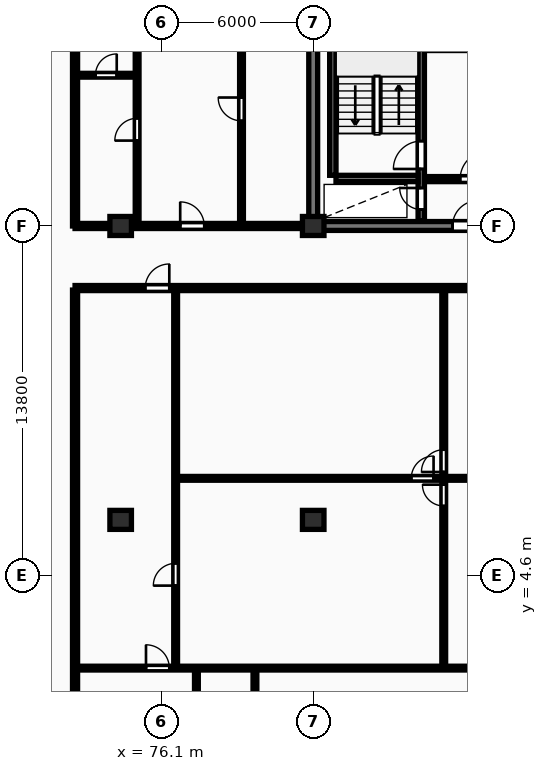
"""IFC4 building model, lengths in metres.
Left out: names, types, materials, properties, quantities, classifications, styles, units other than length and angle.
Written with IfcOpenShell. Run it as: python <this file> out.ifc"""

import sys

from ifc_helpers import new_model, si_unit, direction, frame, frame_2d, origin, origin_2d, place, context, subcontext, project, spatial, rectangle, extrude, element, fill, save


model = new_model("IFC4")
c1 = context("Model", 3, precision=1e-05, world=origin(), true_north=direction((0.0, 1.0)))
c2 = subcontext(c1, "Body", "Model", "MODEL_VIEW")
j1 = project(units=[si_unit("LENGTHUNIT", "METRE"), si_unit("PLANEANGLEUNIT", "RADIAN")], contexts=[c1])
p1 = place(None, origin())
s1 = spatial("IfcSite", under=j1, at=p1, CompositionType="ELEMENT")
p2 = place(p1, origin())
s2 = spatial("IfcBuilding", under=s1, at=p2, CompositionType="ELEMENT")
p3 = place(p2, frame((0.0, 0.0, 132.8)))
s3 = spatial("IfcBuildingStorey", under=s2, at=p3, CompositionType="ELEMENT", Elevation=132.8)
for number, where, z_axis, x_axis in (
    (1, (74.5, 6.8, 0.0), (0.0, 0.0, 1.0), (1.0, 0.0, 0.0)),
    (2, (74.5, 18.4, 0.0), (0.0, 0.0, 1.0), (1.0, 0.0, 0.0)),
    (3, (82.1, 6.8, 0.0), (0.0, 0.0, 1.0), (1.0, 0.0, 0.0)),
    (4, (82.1, 18.4, 0.0), (0.0, 0.0, 1.0), (1.0, 0.0, 0.0)),
):
    element("IfcColumn", number, at=place(p3, frame(where, z_axis=z_axis, x_axis=x_axis)), inside=s3, PredefinedType="COLUMN", context=c2, shape_type="SweptSolid", body=[
        extrude(rectangle(XDim=0.85, YDim=0.75, at=origin_2d()), origin(), (0.0, 0.0, 1.0), 3.25),
    ])
p4 = place(p3, frame((82.1, 18.575, 0.0), z_axis=(0.0, 0.0, 1.0), x_axis=(0.0, 1.0, 0.0)))
e5 = element("IfcWall", 5, at=p4, inside=s3, PredefinedType="SHEAR", context=c2, shape_type="SweptSolid", body=[
    extrude(rectangle(XDim=11.65, YDim=0.35, at=frame_2d((5.825, 0.0))), origin(), (0.0, 0.0, 1.0), 3.25),
])
p5 = place(p3, frame((81.925, 18.4, 0.0), z_axis=(0.0, 0.0, 1.0), x_axis=(1.0, 0.0, 0.0)))
e6 = element("IfcWall", 6, at=p5, inside=s3, PredefinedType="SHEAR", context=c2, shape_type="SweptSolid", body=[
    extrude(rectangle(XDim=36.265, YDim=0.35, at=frame_2d((18.132, 0.0))), origin(), (0.0, 0.0, 1.0), 3.25),
])
p6 = place(p5, frame((5.675, 0.0, 0.0)))
e7 = element("IfcOpeningElement", 7, at=p6, cuts=e6, PredefinedType="OPENING", context=c2, shape_type="SweptSolid", body=[
    extrude(rectangle(XDim=1.0, YDim=2.15, at=frame_2d((0.5, 1.075))), frame((0.0, 0.185, 0.0), z_axis=(0.0, -1.0, 0.0), x_axis=(1.0, 0.0, 0.0)), (0.0, 0.0, 1.0), 0.37),
])
p7 = place(p5, frame((21.925, 0.0, 0.0)))
e8 = element("IfcOpeningElement", 8, at=p7, cuts=e6, PredefinedType="OPENING", context=c2, shape_type="SweptSolid", body=[
    extrude(rectangle(XDim=1.5, YDim=2.2, at=frame_2d((0.75, 1.1))), frame((0.0, 0.185, 0.0), z_axis=(0.0, -1.0, 0.0), x_axis=(1.0, 0.0, 0.0)), (0.0, 0.0, 1.0), 0.37),
])
p8 = place(p5, frame((29.875, 0.0, 0.0)))
e9 = element("IfcOpeningElement", 9, at=p8, cuts=e6, PredefinedType="OPENING", context=c2, shape_type="SweptSolid", body=[
    extrude(rectangle(XDim=1.0, YDim=2.15, at=frame_2d((0.5, 1.075))), frame((0.0, 0.185, 0.0), z_axis=(0.0, -1.0, 0.0), x_axis=(1.0, 0.0, 0.0)), (0.0, 0.0, 1.0), 0.37),
])
p9 = place(p3, frame((82.875, 20.4, 0.0), z_axis=(0.0, 0.0, 1.0), x_axis=(0.0, 1.0, 0.0)))
e10 = element("IfcWall", 10, at=p9, inside=s3, PredefinedType="SHEAR", context=c2, shape_type="SweptSolid", body=[
    extrude(rectangle(XDim=7.6, YDim=0.25, at=frame_2d((3.8, 0.0))), origin(), (0.0, 0.0, 1.0), 3.25),
])
p10 = place(p3, frame((86.365, 18.6, 0.0), z_axis=(0.0, 0.0, 1.0), x_axis=(0.0, 1.0, 0.0)))
e11 = element("IfcWall", 11, at=p10, inside=s3, PredefinedType="SHEAR", context=c2, shape_type="SweptSolid", body=[
    extrude(rectangle(XDim=11.6, YDim=0.25, at=frame_2d((5.8, 0.0))), origin(), (0.0, 0.0, 1.0), 3.25),
])
p11 = place(p10, frame((0.45, 0.0, 0.0)))
e12 = element("IfcOpeningElement", 12, at=p11, cuts=e11, PredefinedType="OPENING", context=c2, shape_type="SweptSolid", body=[
    extrude(rectangle(XDim=0.85, YDim=2.05, at=frame_2d((0.425, 1.025))), frame((0.0, 0.135, 0.0), z_axis=(0.0, -1.0, 0.0), x_axis=(1.0, 0.0, 0.0)), (0.0, 0.0, 1.0), 0.27),
])
p12 = place(p10, frame((2.05, 0.0, 0.0)))
e13 = element("IfcOpeningElement", 13, at=p12, cuts=e11, PredefinedType="OPENING", context=c2, shape_type="SweptSolid", body=[
    extrude(rectangle(XDim=1.1, YDim=2.1, at=frame_2d((0.55, 1.05))), frame((0.0, 0.135, 0.0), z_axis=(0.0, -1.0, 0.0), x_axis=(1.0, 0.0, 0.0)), (0.0, 0.0, 1.0), 0.27),
])
p13 = place(p10, frame((9.95, 0.0, 0.0)))
e14 = element("IfcOpeningElement", 14, at=p13, cuts=e11, PredefinedType="OPENING", context=c2, shape_type="SweptSolid", body=[
    extrude(rectangle(XDim=0.85, YDim=2.05, at=frame_2d((0.425, 1.025))), frame((0.0, 0.135, 0.0), z_axis=(0.0, -1.0, 0.0), x_axis=(1.0, 0.0, 0.0)), (0.0, 0.0, 1.0), 0.27),
])
p14 = place(p3, frame((83.0, 20.275, 0.0), z_axis=(0.0, 0.0, 1.0), x_axis=(1.0, 0.0, 0.0)))
e15 = element("IfcWall", 15, at=p14, inside=s3, PredefinedType="SHEAR", context=c2, shape_type="SweptSolid", body=[
    extrude(rectangle(XDim=3.24, YDim=0.25, at=frame_2d((1.62, 0.0))), origin(), (0.0, 0.0, 1.0), 3.25),
])
p15 = place(p3, frame((86.5, 20.25, 0.0), z_axis=(0.0, 0.0, 1.0), x_axis=(1.0, 0.0, 0.0)))
e16 = element("IfcWall", 16, at=p15, inside=s3, PredefinedType="PARTITIONING", context=c2, shape_type="SweptSolid", body=[
    extrude(rectangle(XDim=4.32, YDim=0.2, at=frame_2d((2.16, 0.0))), origin(), (0.0, 0.0, 1.0), 2.97),
])
p16 = place(p15, frame((1.4, 0.0, 0.0)))
e17 = element("IfcOpeningElement", 17, at=p16, cuts=e16, PredefinedType="OPENING", context=c2, shape_type="SweptSolid", body=[
    extrude(rectangle(XDim=1.1, YDim=2.1, at=frame_2d((0.55, 1.05))), frame((0.0, 0.11, 0.0), z_axis=(0.0, -1.0, 0.0), x_axis=(1.0, 0.0, 0.0)), (0.0, 0.0, 1.0), 0.22),
])
p17 = place(p3, frame((72.7, 18.4, 0.0), z_axis=(0.0, 0.0, 1.0), x_axis=(0.0, 1.0, 0.0)))
e18 = element("IfcWall", 18, at=p17, inside=s3, PredefinedType="PARTITIONING", context=c2, shape_type="SweptSolid", body=[
    extrude(rectangle(XDim=14.1, YDim=0.2, at=frame_2d((7.05, 0.0))), origin(), (0.0, 0.0, 1.0), 2.97),
])
p18 = place(p3, frame((72.7, 24.35, 0.0), z_axis=(0.0, 0.0, 1.0), x_axis=(1.0, 0.0, 0.0)))
e19 = element("IfcWall", 19, at=p18, inside=s3, PredefinedType="PARTITIONING", context=c2, shape_type="SweptSolid", body=[
    extrude(rectangle(XDim=2.45, YDim=0.15, at=frame_2d((1.225, 0.0))), origin(), (0.0, 0.0, 1.0), 2.97),
])
p19 = place(p18, frame((0.805, 0.0, 0.0)))
e20 = element("IfcOpeningElement", 20, at=p19, cuts=e19, PredefinedType="OPENING", context=c2, shape_type="SweptSolid", body=[
    extrude(rectangle(XDim=0.84, YDim=2.04, at=frame_2d((0.42, 1.02))), frame((0.0, 0.085, 0.0), z_axis=(0.0, -1.0, 0.0), x_axis=(1.0, 0.0, 0.0)), (0.0, 0.0, 1.0), 0.17),
])
p20 = place(p3, frame((75.15, 18.45, 0.0), z_axis=(0.0, 0.0, 1.0), x_axis=(0.0, 1.0, 0.0)))
e21 = element("IfcWall", 21, at=p20, inside=s3, PredefinedType="PARTITIONING", context=c2, shape_type="SweptSolid", body=[
    extrude(rectangle(XDim=14.05, YDim=0.15, at=frame_2d((7.025, 0.0))), origin(), (0.0, 0.0, 1.0), 2.97),
])
p21 = place(p20, frame((3.32, 0.0, 0.0)))
e22 = element("IfcOpeningElement", 22, at=p21, cuts=e21, PredefinedType="OPENING", context=c2, shape_type="SweptSolid", body=[
    extrude(rectangle(XDim=0.88, YDim=2.06, at=frame_2d((0.44, 1.03))), frame((0.0, 0.085, 0.0), z_axis=(0.0, -1.0, 0.0), x_axis=(1.0, 0.0, 0.0)), (0.0, 0.0, 1.0), 0.17),
])
p22 = place(p3, frame((79.27, 18.45, 0.0), z_axis=(0.0, 0.0, 1.0), x_axis=(0.0, 1.0, 0.0)))
e23 = element("IfcWall", 23, at=p22, inside=s3, PredefinedType="PARTITIONING", context=c2, shape_type="SweptSolid", body=[
    extrude(rectangle(XDim=9.12, YDim=0.15, at=frame_2d((4.56, 0.0))), origin(), (0.0, 0.0, 1.0), 2.97),
])
p23 = place(p22, frame((4.1, 0.0, 0.0)))
e24 = element("IfcOpeningElement", 24, at=p23, cuts=e23, PredefinedType="OPENING", context=c2, shape_type="SweptSolid", body=[
    extrude(rectangle(XDim=0.92, YDim=2.08, at=frame_2d((0.46, 1.04))), frame((0.0, 0.085, 0.0), z_axis=(0.0, -1.0, 0.0), x_axis=(1.0, 0.0, 0.0)), (0.0, 0.0, 1.0), 0.17),
])
p24 = place(p3, frame((72.7, 18.4, 0.0), z_axis=(0.0, 0.0, 1.0), x_axis=(1.0, 0.0, 0.0)))
e25 = element("IfcWall", 25, at=p24, inside=s3, PredefinedType="PARTITIONING", context=c2, shape_type="SweptSolid", body=[
    extrude(rectangle(XDim=9.25, YDim=0.2, at=frame_2d((4.625, 0.0))), origin(), (0.0, 0.0, 1.0), 2.358),
])
p25 = place(p24, frame((4.15, 0.0, 0.0)))
e26 = element("IfcOpeningElement", 26, at=p25, cuts=e25, PredefinedType="OPENING", context=c2, shape_type="SweptSolid", body=[
    extrude(rectangle(XDim=0.95, YDim=2.15, at=frame_2d((0.475, 1.075))), frame((0.0, 0.11, 0.0), z_axis=(0.0, -1.0, 0.0), x_axis=(1.0, 0.0, 0.0)), (0.0, 0.0, 1.0), 0.22),
])
p26 = place(p3, frame((72.7, -8.7, 0.0), z_axis=(0.0, 0.0, 1.0), x_axis=(0.0, 1.0, 0.0)))
e27 = element("IfcWall", 27, at=p26, inside=s3, PredefinedType="PARTITIONING", context=c2, shape_type="SweptSolid", body=[
    extrude(rectangle(XDim=24.57, YDim=0.2, at=frame_2d((12.285, 0.0))), origin(), (0.0, 0.0, 1.0), 2.97),
])
p27 = place(p3, frame((87.252, 0.99, 0.0), z_axis=(0.0, 0.0, 1.0), x_axis=(0.0, 1.0, 0.0)))
e28 = element("IfcWall", 28, at=p27, inside=s3, PredefinedType="PARTITIONING", context=c2, shape_type="SweptSolid", body=[
    extrude(rectangle(XDim=14.9, YDim=0.15, at=frame_2d((7.45, 0.0))), origin(), (0.0, 0.0, 1.0), 2.97),
])
p28 = place(p27, frame((6.36, 0.0, 0.0)))
e29 = element("IfcOpeningElement", 29, at=p28, cuts=e28, PredefinedType="OPENING", context=c2, shape_type="SweptSolid", body=[
    extrude(rectangle(XDim=0.84, YDim=2.04, at=frame_2d((0.42, 1.02))), frame((0.0, 0.085, 0.0), z_axis=(0.0, -1.0, 0.0), x_axis=(1.0, 0.0, 0.0)), (0.0, 0.0, 1.0), 0.17),
])
p29 = place(p27, frame((7.7, 0.0, 0.0)))
e30 = element("IfcOpeningElement", 30, at=p29, cuts=e28, PredefinedType="OPENING", context=c2, shape_type="SweptSolid", body=[
    extrude(rectangle(XDim=0.88, YDim=2.06, at=frame_2d((0.44, 1.03))), frame((0.0, 0.085, 0.0), z_axis=(0.0, -1.0, 0.0), x_axis=(1.0, 0.0, 0.0)), (0.0, 0.0, 1.0), 0.17),
])
p30 = place(p3, frame((76.73, 8.44, 0.0), z_axis=(0.0, 0.0, 1.0), x_axis=(1.0, 0.0, 0.0)))
e31 = element("IfcWall", 31, at=p30, inside=s3, PredefinedType="PARTITIONING", context=c2, shape_type="SweptSolid", body=[
    extrude(rectangle(XDim=20.844, YDim=0.15, at=frame_2d((10.422, 0.0))), origin(), (0.0, 0.0, 1.0), 2.97),
])
p31 = place(p30, frame((9.241, 0.0, 0.0)))
e32 = element("IfcOpeningElement", 32, at=p31, cuts=e31, PredefinedType="OPENING", context=c2, shape_type="SweptSolid", body=[
    extrude(rectangle(XDim=0.88, YDim=2.06, at=frame_2d((0.44, 1.03))), frame((0.0, 0.085, 0.0), z_axis=(0.0, -1.0, 0.0), x_axis=(1.0, 0.0, 0.0)), (0.0, 0.0, 1.0), 0.17),
])
p32 = place(p3, frame((76.67, 0.99, 0.0), z_axis=(0.0, 0.0, 1.0), x_axis=(0.0, 1.0, 0.0)))
e33 = element("IfcWall", 33, at=p32, inside=s3, PredefinedType="PARTITIONING", context=c2, shape_type="SweptSolid", body=[
    extrude(rectangle(XDim=14.9, YDim=0.15, at=frame_2d((7.45, 0.0))), origin(), (0.0, 0.0, 1.0), 2.97),
])
p33 = place(p32, frame((3.216, 0.0, 0.0)))
e34 = element("IfcOpeningElement", 34, at=p33, cuts=e33, PredefinedType="OPENING", context=c2, shape_type="SweptSolid", body=[
    extrude(rectangle(XDim=0.88, YDim=2.06, at=frame_2d((0.44, 1.03))), frame((0.0, 0.085, 0.0), z_axis=(0.0, -1.0, 0.0), x_axis=(1.0, 0.0, 0.0)), (0.0, 0.0, 1.0), 0.17),
])
p34 = place(p3, frame((79.8, -1.67, 0.0), z_axis=(0.0, 0.0, 1.0), x_axis=(0.0, 1.0, 0.0)))
e35 = element("IfcWall", 35, at=p34, inside=s3, PredefinedType="PARTITIONING", context=c2, shape_type="SweptSolid", body=[
    extrude(rectangle(XDim=2.58, YDim=0.15, at=frame_2d((1.29, 0.0))), origin(), (0.0, 0.0, 1.0), 2.97),
])
p35 = place(p3, frame((77.49, -8.7, 0.0), z_axis=(0.0, 0.0, 1.0), x_axis=(0.0, 1.0, 0.0)))
e36 = element("IfcWall", 36, at=p35, inside=s3, PredefinedType="PARTITIONING", context=c2, shape_type="SweptSolid", body=[
    extrude(rectangle(XDim=9.61, YDim=0.15, at=frame_2d((4.805, 0.0))), origin(), (0.0, 0.0, 1.0), 2.97),
])
p36 = place(p35, frame((4.87, 0.0, 0.0)))
e37 = element("IfcOpeningElement", 37, at=p36, cuts=e36, PredefinedType="OPENING", context=c2, shape_type="SweptSolid", body=[
    extrude(rectangle(XDim=0.92, YDim=2.08, at=frame_2d((0.46, 1.04))), frame((0.0, 0.085, 0.0), z_axis=(0.0, -1.0, 0.0), x_axis=(1.0, 0.0, 0.0)), (0.0, 0.0, 1.0), 0.17),
])
p37 = place(p3, frame((72.78, 0.95, 0.0), z_axis=(0.0, 0.0, 1.0), x_axis=(1.0, 0.0, 0.0)))
e38 = element("IfcWall", 38, at=p37, inside=s3, PredefinedType="PARTITIONING", context=c2, shape_type="SweptSolid", body=[
    extrude(rectangle(XDim=24.794, YDim=0.15, at=frame_2d((12.397, 0.0))), origin(), (0.0, 0.0, 1.0), 2.97),
])
p38 = place(p37, frame((2.72, 0.0, 0.0)))
e39 = element("IfcOpeningElement", 39, at=p38, cuts=e38, PredefinedType="OPENING", context=c2, shape_type="SweptSolid", body=[
    extrude(rectangle(XDim=0.92, YDim=2.08, at=frame_2d((0.46, 1.04))), frame((0.0, 0.085, 0.0), z_axis=(0.0, -1.0, 0.0), x_axis=(1.0, 0.0, 0.0)), (0.0, 0.0, 1.0), 0.17),
])
p39 = place(p3, frame((72.7, 15.95, 0.0), z_axis=(0.0, 0.0, 1.0), x_axis=(1.0, 0.0, 0.0)))
e40 = element("IfcWall", 40, at=p39, inside=s3, PredefinedType="PARTITIONING", context=c2, shape_type="SweptSolid", body=[
    extrude(rectangle(XDim=58.0, YDim=0.2, at=frame_2d((29.0, 0.0))), origin(), (0.0, 0.0, 1.0), 2.97),
])
p40 = place(p39, frame((2.77, 0.0, 0.0)))
e41 = element("IfcOpeningElement", 41, at=p40, cuts=e40, PredefinedType="OPENING", context=c2, shape_type="SweptSolid", body=[
    extrude(rectangle(XDim=0.95, YDim=2.15, at=frame_2d((0.475, 1.075))), frame((0.0, 0.11, 0.0), z_axis=(0.0, -1.0, 0.0), x_axis=(1.0, 0.0, 0.0)), (0.0, 0.0, 1.0), 0.22),
])
p41 = place(p39, frame((25.324, 0.0, 0.0)))
e42 = element("IfcOpeningElement", 42, at=p41, cuts=e40, PredefinedType="OPENING", context=c2, shape_type="SweptSolid", body=[
    extrude(rectangle(XDim=0.95, YDim=2.15, at=frame_2d((0.475, 1.075))), frame((0.0, 0.11, 0.0), z_axis=(0.0, -1.0, 0.0), x_axis=(1.0, 0.0, 0.0)), (0.0, 0.0, 1.0), 0.22),
])
p42 = place(p39, frame((46.356, 0.0, 0.0)))
e43 = element("IfcOpeningElement", 43, at=p42, cuts=e40, PredefinedType="OPENING", context=c2, shape_type="SweptSolid", body=[
    extrude(rectangle(XDim=0.95, YDim=2.15, at=frame_2d((0.475, 1.075))), frame((0.0, 0.11, 0.0), z_axis=(0.0, -1.0, 0.0), x_axis=(1.0, 0.0, 0.0)), (0.0, 0.0, 1.0), 0.22),
])
p43 = place(p6, origin())
e44 = element("IfcDoor", 44, at=p43, inside=s3, OperationType="SINGLE_SWING_RIGHT", PredefinedType="DOOR", context=c2, shape_type="SweptSolid", body=[
    extrude(rectangle(XDim=1.0, YDim=2.15, at=frame_2d((0.5, 1.075))), frame((0.0, 0.025, 0.0), z_axis=(0.0, -1.0, 0.0), x_axis=(1.0, 0.0, 0.0)), (0.0, 0.0, 1.0), 0.05),
])
fill(e7, e44)
p44 = place(p11, origin())
e45 = element("IfcDoor", 45, at=p44, inside=s3, OperationType="SINGLE_SWING_RIGHT", PredefinedType="DOOR", context=c2, shape_type="SweptSolid", body=[
    extrude(rectangle(XDim=0.85, YDim=2.05, at=frame_2d((0.425, 1.025))), frame((0.0, 0.025, 0.0), z_axis=(0.0, -1.0, 0.0), x_axis=(1.0, 0.0, 0.0)), (0.0, 0.0, 1.0), 0.05),
])
fill(e12, e45)
p45 = place(p12, origin())
e46 = element("IfcDoor", 46, at=p45, inside=s3, OperationType="SINGLE_SWING_LEFT", PredefinedType="DOOR", context=c2, shape_type="SweptSolid", body=[
    extrude(rectangle(XDim=1.1, YDim=2.1, at=frame_2d((0.55, 1.05))), frame((0.0, 0.025, 0.0), z_axis=(0.0, -1.0, 0.0), x_axis=(1.0, 0.0, 0.0)), (0.0, 0.0, 1.0), 0.05),
])
fill(e13, e46)
p46 = place(p16, origin())
e47 = element("IfcDoor", 47, at=p46, inside=s3, OperationType="SINGLE_SWING_RIGHT", PredefinedType="DOOR", context=c2, shape_type="SweptSolid", body=[
    extrude(rectangle(XDim=1.1, YDim=2.1, at=frame_2d((0.55, 1.05))), frame((0.0, 0.025, 0.0), z_axis=(0.0, -1.0, 0.0), x_axis=(1.0, 0.0, 0.0)), (0.0, 0.0, 1.0), 0.05),
])
fill(e17, e47)
p47 = place(p19, origin())
e48 = element("IfcDoor", 48, at=p47, inside=s3, OperationType="SINGLE_SWING_RIGHT", PredefinedType="DOOR", context=c2, shape_type="SweptSolid", body=[
    extrude(rectangle(XDim=0.84, YDim=2.04, at=frame_2d((0.42, 1.02))), frame((0.0, 0.025, 0.0), z_axis=(0.0, -1.0, 0.0), x_axis=(1.0, 0.0, 0.0)), (0.0, 0.0, 1.0), 0.05),
])
fill(e20, e48)
p48 = place(p21, origin())
e49 = element("IfcDoor", 49, at=p48, inside=s3, OperationType="SINGLE_SWING_LEFT", PredefinedType="DOOR", context=c2, shape_type="SweptSolid", body=[
    extrude(rectangle(XDim=0.88, YDim=2.06, at=frame_2d((0.44, 1.03))), frame((0.0, 0.025, 0.0), z_axis=(0.0, -1.0, 0.0), x_axis=(1.0, 0.0, 0.0)), (0.0, 0.0, 1.0), 0.05),
])
fill(e22, e49)
p49 = place(p23, origin())
e50 = element("IfcDoor", 50, at=p49, inside=s3, OperationType="SINGLE_SWING_RIGHT", PredefinedType="DOOR", context=c2, shape_type="SweptSolid", body=[
    extrude(rectangle(XDim=0.92, YDim=2.08, at=frame_2d((0.46, 1.04))), frame((0.0, 0.025, 0.0), z_axis=(0.0, -1.0, 0.0), x_axis=(1.0, 0.0, 0.0)), (0.0, 0.0, 1.0), 0.05),
])
fill(e24, e50)
p50 = place(p25, origin())
e51 = element("IfcDoor", 51, at=p50, inside=s3, OperationType="SINGLE_SWING_LEFT", PredefinedType="DOOR", context=c2, shape_type="SweptSolid", body=[
    extrude(rectangle(XDim=0.95, YDim=2.15, at=frame_2d((0.475, 1.075))), frame((0.0, 0.025, 0.0), z_axis=(0.0, -1.0, 0.0), x_axis=(1.0, 0.0, 0.0)), (0.0, 0.0, 1.0), 0.05),
])
fill(e26, e51)
p51 = place(p28, origin())
e52 = element("IfcDoor", 52, at=p51, inside=s3, OperationType="SINGLE_SWING_RIGHT", PredefinedType="DOOR", context=c2, shape_type="SweptSolid", body=[
    extrude(rectangle(XDim=0.84, YDim=2.04, at=frame_2d((0.42, 1.02))), frame((0.0, 0.025, 0.0), z_axis=(0.0, -1.0, 0.0), x_axis=(1.0, 0.0, 0.0)), (0.0, 0.0, 1.0), 0.05),
])
fill(e29, e52)
p52 = place(p29, origin())
e53 = element("IfcDoor", 53, at=p52, inside=s3, OperationType="SINGLE_SWING_LEFT", PredefinedType="DOOR", context=c2, shape_type="SweptSolid", body=[
    extrude(rectangle(XDim=0.88, YDim=2.06, at=frame_2d((0.44, 1.03))), frame((0.0, 0.025, 0.0), z_axis=(0.0, -1.0, 0.0), x_axis=(1.0, 0.0, 0.0)), (0.0, 0.0, 1.0), 0.05),
])
fill(e30, e53)
p53 = place(p31, origin())
e54 = element("IfcDoor", 54, at=p53, inside=s3, OperationType="SINGLE_SWING_RIGHT", PredefinedType="DOOR", context=c2, shape_type="SweptSolid", body=[
    extrude(rectangle(XDim=0.88, YDim=2.06, at=frame_2d((0.44, 1.03))), frame((0.0, 0.025, 0.0), z_axis=(0.0, -1.0, 0.0), x_axis=(1.0, 0.0, 0.0)), (0.0, 0.0, 1.0), 0.05),
])
fill(e32, e54)
p54 = place(p33, origin())
e55 = element("IfcDoor", 55, at=p54, inside=s3, OperationType="SINGLE_SWING_LEFT", PredefinedType="DOOR", context=c2, shape_type="SweptSolid", body=[
    extrude(rectangle(XDim=0.88, YDim=2.06, at=frame_2d((0.44, 1.03))), frame((0.0, 0.025, 0.0), z_axis=(0.0, -1.0, 0.0), x_axis=(1.0, 0.0, 0.0)), (0.0, 0.0, 1.0), 0.05),
])
fill(e34, e55)
p55 = place(p38, origin())
e56 = element("IfcDoor", 56, at=p55, inside=s3, OperationType="SINGLE_SWING_LEFT", PredefinedType="DOOR", context=c2, shape_type="SweptSolid", body=[
    extrude(rectangle(XDim=0.92, YDim=2.08, at=frame_2d((0.46, 1.04))), frame((0.0, 0.025, 0.0), z_axis=(0.0, -1.0, 0.0), x_axis=(1.0, 0.0, 0.0)), (0.0, 0.0, 1.0), 0.05),
])
fill(e39, e56)
p56 = place(p40, origin())
e57 = element("IfcDoor", 57, at=p56, inside=s3, OperationType="SINGLE_SWING_RIGHT", PredefinedType="DOOR", context=c2, shape_type="SweptSolid", body=[
    extrude(rectangle(XDim=0.95, YDim=2.15, at=frame_2d((0.475, 1.075))), frame((0.0, 0.025, 0.0), z_axis=(0.0, -1.0, 0.0), x_axis=(1.0, 0.0, 0.0)), (0.0, 0.0, 1.0), 0.05),
])
fill(e41, e57)
save(model, sys.argv[1])
